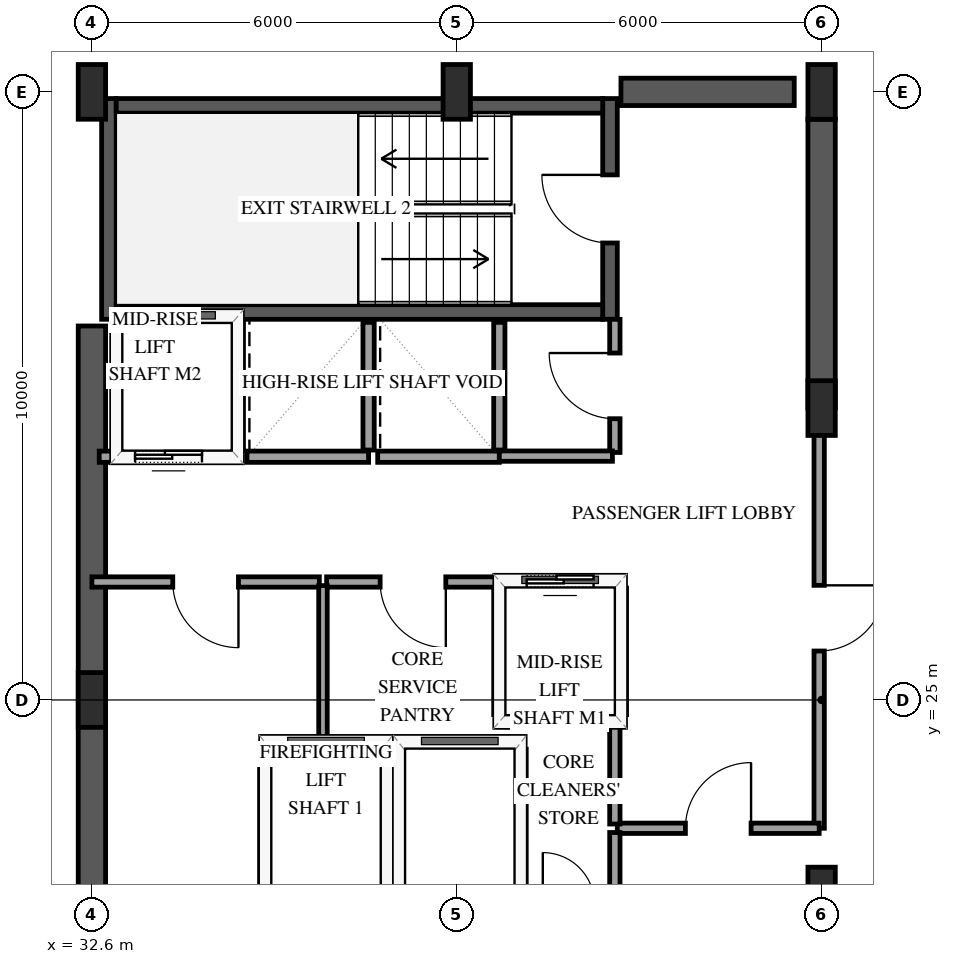
"""IFC4 building model, lengths in metres.
Left out: names, types, materials, properties, quantities, classifications, styles, units other than length and angle.
Written with IfcOpenShell. Run it as: python <this file> out.ifc"""

import sys

from ifc_helpers import new_model, si_unit, direction, frame, frame_2d, origin, origin_2d, place, context, subcontext, project, spatial, rectangle, extrude, element, fill, save


model = new_model("IFC4")
c1 = context("Model", 3, precision=1e-05, world=origin(), true_north=direction((0.0, 1.0)))
c2 = subcontext(c1, "Body", "Model", "MODEL_VIEW")
j1 = project(units=[si_unit("LENGTHUNIT", "METRE"), si_unit("PLANEANGLEUNIT", "RADIAN")], contexts=[c1])
p1 = place(None, origin())
s1 = spatial("IfcSite", under=j1, at=p1, CompositionType="ELEMENT")
p2 = place(p1, origin())
s2 = spatial("IfcBuilding", under=s1, at=p2, CompositionType="ELEMENT")
p3 = place(p2, frame((0.0, 0.0, 197.8)))
s3 = spatial("IfcBuildingStorey", under=s2, at=p3, CompositionType="ELEMENT", Elevation=197.8)
p4 = place(p3, frame((32.88, 31.26, 0.0), z_axis=(0.0, 0.0, 1.0), x_axis=(0.0, 1.0, 0.0)))
e1 = element("IfcWall", 1, at=p4, inside=s3, PredefinedType="SHEAR", context=c2, shape_type="SweptSolid", body=[
    extrude(rectangle(XDim=3.63, YDim=0.24, at=frame_2d((1.815, 0.0))), origin(), (0.0, 0.0, 1.0), 3.6),
])
p5 = place(p3, frame((41.12, 31.26, 0.0), z_axis=(0.0, 0.0, 1.0), x_axis=(0.0, 1.0, 0.0)))
e2 = element("IfcWall", 2, at=p5, inside=s3, PredefinedType="SHEAR", context=c2, shape_type="SweptSolid", body=[
    extrude(rectangle(XDim=3.63, YDim=0.24, at=frame_2d((1.815, 0.0))), origin(), (0.0, 0.0, 1.0), 3.6),
])
p6 = place(p5, frame((1.255, 0.0, 0.0)))
e3 = element("IfcOpeningElement", 3, at=p6, cuts=e2, PredefinedType="OPENING", context=c2, shape_type="SweptSolid", body=[
    extrude(rectangle(XDim=1.12, YDim=2.15, at=frame_2d((0.56, 1.075))), frame((0.0, 0.13, 0.0), z_axis=(0.0, -1.0, 0.0), x_axis=(1.0, 0.0, 0.0)), (0.0, 0.0, 1.0), 0.26),
])
for number, where, z_axis, x_axis in (
    (4, (33.0, 31.38, 0.0), (0.0, 0.0, 1.0), (1.0, 0.0, 0.0)),
    (5, (33.0, 34.77, 0.0), (0.0, 0.0, 1.0), (1.0, 0.0, 0.0)),
):
    element("IfcWall", number, at=place(p3, frame(where, z_axis=z_axis, x_axis=x_axis)), inside=s3, PredefinedType="SHEAR", context=c2, shape_type="SweptSolid", body=[
        extrude(rectangle(XDim=8.0, YDim=0.24, at=frame_2d((4.0, 0.0))), origin(), (0.0, 0.0, 1.0), 3.6),
    ])
p7 = place(p3, frame((32.6, 18.85, 0.0), z_axis=(0.0, 0.0, 1.0), x_axis=(0.0, 1.0, 0.0)))
e6 = element("IfcWall", 6, at=p7, inside=s3, PredefinedType="SHEAR", context=c2, shape_type="SweptSolid", body=[
    extrude(rectangle(XDim=12.3, YDim=0.45, at=frame_2d((6.15, 0.0))), origin(), (0.0, 0.0, 1.0), 3.6),
])
p8 = place(p3, frame((41.3, 35.0, 0.0), z_axis=(0.0, 0.0, 1.0), x_axis=(1.0, 0.0, 0.0)))
e7 = element("IfcWall", 7, at=p8, inside=s3, PredefinedType="SHEAR", context=c2, shape_type="SweptSolid", body=[
    extrude(rectangle(XDim=2.85, YDim=0.45, at=frame_2d((1.425, 0.0))), origin(), (0.0, 0.0, 1.0), 3.6),
])
p9 = place(p3, frame((44.6, 29.8, 0.0), z_axis=(0.0, 0.0, 1.0), x_axis=(0.0, 1.0, 0.0)))
e8 = element("IfcWall", 8, at=p9, inside=s3, PredefinedType="SHEAR", context=c2, shape_type="SweptSolid", body=[
    extrude(rectangle(XDim=4.75, YDim=0.45, at=frame_2d((2.375, 0.0))), origin(), (0.0, 0.0, 1.0), 3.6),
])
for number, where, z_axis, x_axis in (
    (9, (32.6, 25.0, 0.0), (0.0, 0.0, 1.0), (1.0, 0.0, 0.0)),
    (10, (32.6, 35.0, 0.0), (0.0, 0.0, 1.0), (1.0, 0.0, 0.0)),
    (11, (38.6, 35.0, 0.0), (0.0, 0.0, 1.0), (1.0, 0.0, 0.0)),
    (12, (44.6, 21.8, 0.0), (0.0, 0.0, 1.0), (1.0, 0.0, 0.0)),
    (13, (44.6, 29.8, 0.0), (0.0, 0.0, 1.0), (1.0, 0.0, 0.0)),
    (14, (44.6, 35.0, 0.0), (0.0, 0.0, 1.0), (1.0, 0.0, 0.0)),
):
    element("IfcColumn", number, at=place(p3, frame(where, z_axis=z_axis, x_axis=x_axis)), inside=s3, PredefinedType="PILASTER", context=c2, shape_type="SweptSolid", body=[
        extrude(rectangle(XDim=0.45, YDim=0.9, at=origin_2d()), origin(), (0.0, 0.0, 1.0), 3.6),
    ])
p10 = place(p3, frame((35.45, 24.3, 0.0), z_axis=(0.0, 0.0, 1.0), x_axis=(1.0, 0.0, 0.0)))
e15 = element("IfcWall", 15, at=p10, inside=s3, PredefinedType="SOLIDWALL", context=c2, shape_type="SweptSolid", body=[
    extrude(rectangle(XDim=2.0, YDim=0.185, at=frame_2d((1.0, 0.0))), origin(), (0.0, 0.0, 1.0), 3.3),
])
for number, where, z_axis, x_axis in (
    (16, (35.45, 21.81, 0.0), (0.0, 0.0, 1.0), (0.0, 1.0, 0.0)),
    (17, (37.45, 21.81, 0.0), (0.0, 0.0, 1.0), (0.0, 1.0, 0.0)),
):
    element("IfcWall", number, at=place(p3, frame(where, z_axis=z_axis, x_axis=x_axis)), inside=s3, PredefinedType="SOLIDWALL", context=c2, shape_type="SweptSolid", body=[
        extrude(rectangle(XDim=2.38, YDim=0.185, at=frame_2d((1.19, 0.0))), origin(), (0.0, 0.0, 1.0), 3.3),
    ])
p11 = place(p3, frame((37.65, 24.3, 0.0), z_axis=(0.0, 0.0, 1.0), x_axis=(1.0, 0.0, 0.0)))
e18 = element("IfcWall", 18, at=p11, inside=s3, PredefinedType="SOLIDWALL", context=c2, shape_type="SweptSolid", body=[
    extrude(rectangle(XDim=2.0, YDim=0.185, at=frame_2d((1.0, 0.0))), origin(), (0.0, 0.0, 1.0), 3.3),
])
p12 = place(p3, frame((39.65, 21.81, 0.0), z_axis=(0.0, 0.0, 1.0), x_axis=(0.0, 1.0, 0.0)))
e19 = element("IfcWall", 19, at=p12, inside=s3, PredefinedType="SOLIDWALL", context=c2, shape_type="SweptSolid", body=[
    extrude(rectangle(XDim=2.38, YDim=0.185, at=frame_2d((1.19, 0.0))), origin(), (0.0, 0.0, 1.0), 3.3),
])
p13 = place(p3, frame((39.3, 24.65, 0.0), z_axis=(0.0, 0.0, 1.0), x_axis=(1.0, 0.0, 0.0)))
e20 = element("IfcWall", 20, at=p13, inside=s3, PredefinedType="SOLIDWALL", context=c2, shape_type="SweptSolid", body=[
    extrude(rectangle(XDim=2.0, YDim=0.185, at=frame_2d((1.0, 0.0))), origin(), (0.0, 0.0, 1.0), 3.3),
])
p14 = place(p3, frame((39.3, 26.95, 0.0), z_axis=(0.0, 0.0, 1.0), x_axis=(1.0, 0.0, 0.0)))
e21 = element("IfcWall", 21, at=p14, inside=s3, PredefinedType="SOLIDWALL", context=c2, shape_type="SweptSolid", body=[
    extrude(rectangle(XDim=2.0, YDim=0.185, at=frame_2d((1.0, 0.0))), origin(), (0.0, 0.0, 1.0), 3.3),
])
p15 = place(p14, frame((0.45, 0.0, 0.0)))
e22 = element("IfcOpeningElement", 22, at=p15, cuts=e21, PredefinedType="OPENING", context=c2, shape_type="SweptSolid", body=[
    extrude(rectangle(XDim=1.1, YDim=2.15, at=frame_2d((0.55, 1.075))), frame((0.0, 0.103, 0.0), z_axis=(0.0, -1.0, 0.0), x_axis=(1.0, 0.0, 0.0)), (0.0, 0.0, 1.0), 0.205),
])
for number, where, z_axis, x_axis in (
    (23, (39.3, 24.76, 0.0), (0.0, 0.0, 1.0), (0.0, 1.0, 0.0)),
    (24, (41.3, 24.76, 0.0), (0.0, 0.0, 1.0), (0.0, 1.0, 0.0)),
):
    element("IfcWall", number, at=place(p3, frame(where, z_axis=z_axis, x_axis=x_axis)), inside=s3, PredefinedType="SOLIDWALL", context=c2, shape_type="SweptSolid", body=[
        extrude(rectangle(XDim=2.08, YDim=0.185, at=frame_2d((1.04, 0.0))), origin(), (0.0, 0.0, 1.0), 3.3),
    ])
p16 = place(p3, frame((32.72, 29.0, 0.0), z_axis=(0.0, 0.0, 1.0), x_axis=(1.0, 0.0, 0.0)))
e25 = element("IfcWall", 25, at=p16, inside=s3, PredefinedType="SOLIDWALL", context=c2, shape_type="SweptSolid", body=[
    extrude(rectangle(XDim=2.28, YDim=0.185, at=frame_2d((1.14, 0.0))), origin(), (0.0, 0.0, 1.0), 3.3),
])
p17 = place(p16, frame((0.59, 0.0, 0.0)))
e26 = element("IfcOpeningElement", 26, at=p17, cuts=e25, PredefinedType="OPENING", context=c2, shape_type="SweptSolid", body=[
    extrude(rectangle(XDim=1.1, YDim=2.15, at=frame_2d((0.55, 1.075))), frame((0.0, 0.103, 0.0), z_axis=(0.0, -1.0, 0.0), x_axis=(1.0, 0.0, 0.0)), (0.0, 0.0, 1.0), 0.205),
])
p18 = place(p3, frame((35.0, 29.11, 0.0), z_axis=(0.0, 0.0, 1.0), x_axis=(0.0, 1.0, 0.0)))
e27 = element("IfcWall", 27, at=p18, inside=s3, PredefinedType="SOLIDWALL", context=c2, shape_type="SweptSolid", body=[
    extrude(rectangle(XDim=2.1, YDim=0.185, at=frame_2d((1.05, 0.0))), origin(), (0.0, 0.0, 1.0), 3.3),
])
p19 = place(p3, frame((35.15, 29.0, 0.0), z_axis=(0.0, 0.0, 1.0), x_axis=(1.0, 0.0, 0.0)))
e28 = element("IfcWall", 28, at=p19, inside=s3, PredefinedType="SOLIDWALL", context=c2, shape_type="SweptSolid", body=[
    extrude(rectangle(XDim=2.0, YDim=0.185, at=frame_2d((1.0, 0.0))), origin(), (0.0, 0.0, 1.0), 3.3),
])
p20 = place(p3, frame((37.15, 29.11, 0.0), z_axis=(0.0, 0.0, 1.0), x_axis=(0.0, 1.0, 0.0)))
e29 = element("IfcWall", 29, at=p20, inside=s3, PredefinedType="SOLIDWALL", context=c2, shape_type="SweptSolid", body=[
    extrude(rectangle(XDim=2.1, YDim=0.185, at=frame_2d((1.05, 0.0))), origin(), (0.0, 0.0, 1.0), 3.3),
])
p21 = place(p3, frame((37.3, 29.0, 0.0), z_axis=(0.0, 0.0, 1.0), x_axis=(1.0, 0.0, 0.0)))
e30 = element("IfcWall", 30, at=p21, inside=s3, PredefinedType="SOLIDWALL", context=c2, shape_type="SweptSolid", body=[
    extrude(rectangle(XDim=2.0, YDim=0.185, at=frame_2d((1.0, 0.0))), origin(), (0.0, 0.0, 1.0), 3.3),
])
p22 = place(p3, frame((39.3, 29.11, 0.0), z_axis=(0.0, 0.0, 1.0), x_axis=(0.0, 1.0, 0.0)))
e31 = element("IfcWall", 31, at=p22, inside=s3, PredefinedType="SOLIDWALL", context=c2, shape_type="SweptSolid", body=[
    extrude(rectangle(XDim=2.1, YDim=0.185, at=frame_2d((1.05, 0.0))), origin(), (0.0, 0.0, 1.0), 3.3),
])
p23 = place(p3, frame((44.56, 29.8, 0.0), z_axis=(0.0, 0.0, 1.0), x_axis=(0.0, -1.0, 0.0)))
e32 = element("IfcWall", 32, at=p23, inside=s3, PredefinedType="PARTITIONING", context=c2, shape_type="SweptSolid", body=[
    extrude(rectangle(XDim=6.91, YDim=0.17, at=frame_2d((3.455, 0.0))), origin(), (0.0, 0.0, 1.0), 2.34),
])
p24 = place(p23, frame((2.915, 0.0, 0.0)))
e33 = element("IfcOpeningElement", 33, at=p24, cuts=e32, PredefinedType="OPENING", context=c2, shape_type="SweptSolid", body=[
    extrude(rectangle(XDim=1.08, YDim=2.15, at=frame_2d((0.54, 1.075))), frame((0.0, 0.095, 0.0), z_axis=(0.0, -1.0, 0.0), x_axis=(1.0, 0.0, 0.0)), (0.0, 0.0, 1.0), 0.19),
])
p25 = place(p3, frame((36.34, 26.94, 0.0), z_axis=(0.0, 0.0, 1.0), x_axis=(-1.0, 0.0, 0.0)))
e34 = element("IfcWall", 34, at=p25, inside=s3, PredefinedType="PARTITIONING", context=c2, shape_type="SweptSolid", body=[
    extrude(rectangle(XDim=3.74, YDim=0.17, at=frame_2d((1.87, 0.0))), origin(), (0.0, 0.0, 1.0), 3.3),
])
p26 = place(p25, frame((1.33, 0.0, 0.0)))
e35 = element("IfcOpeningElement", 35, at=p26, cuts=e34, PredefinedType="OPENING", context=c2, shape_type="SweptSolid", body=[
    extrude(rectangle(XDim=1.08, YDim=2.15, at=frame_2d((0.54, 1.075))), frame((0.0, 0.095, 0.0), z_axis=(0.0, -1.0, 0.0), x_axis=(1.0, 0.0, 0.0)), (0.0, 0.0, 1.0), 0.19),
])
p27 = place(p3, frame((41.24, 22.89, 0.0), z_axis=(0.0, 0.0, 1.0), x_axis=(1.0, 0.0, 0.0)))
e36 = element("IfcWall", 36, at=p27, inside=s3, PredefinedType="PARTITIONING", context=c2, shape_type="SweptSolid", body=[
    extrude(rectangle(XDim=3.32, YDim=0.17, at=frame_2d((1.66, 0.0))), origin(), (0.0, 0.0, 1.0), 3.3),
])
p28 = place(p27, frame((1.12, 0.0, 0.0)))
e37 = element("IfcOpeningElement", 37, at=p28, cuts=e36, PredefinedType="OPENING", context=c2, shape_type="SweptSolid", body=[
    extrude(rectangle(XDim=1.08, YDim=2.15, at=frame_2d((0.54, 1.075))), frame((0.0, 0.095, 0.0), z_axis=(0.0, -1.0, 0.0), x_axis=(1.0, 0.0, 0.0)), (0.0, 0.0, 1.0), 0.19),
])
p29 = place(p3, frame((39.3, 26.94, 0.0), z_axis=(0.0, 0.0, 1.0), x_axis=(-1.0, 0.0, 0.0)))
e38 = element("IfcWall", 38, at=p29, inside=s3, PredefinedType="PARTITIONING", context=c2, shape_type="SweptSolid", body=[
    extrude(rectangle(XDim=2.84, YDim=0.17, at=frame_2d((1.42, 0.0))), origin(), (0.0, 0.0, 1.0), 3.3),
])
p30 = place(p29, frame((0.88, 0.0, 0.0)))
e39 = element("IfcOpeningElement", 39, at=p30, cuts=e38, PredefinedType="OPENING", context=c2, shape_type="SweptSolid", body=[
    extrude(rectangle(XDim=1.08, YDim=2.15, at=frame_2d((0.54, 1.075))), frame((0.0, 0.095, 0.0), z_axis=(0.0, -1.0, 0.0), x_axis=(1.0, 0.0, 0.0)), (0.0, 0.0, 1.0), 0.19),
])
p31 = place(p3, frame((36.4, 26.88, 0.0), z_axis=(0.0, 0.0, 1.0), x_axis=(0.0, -1.0, 0.0)))
e40 = element("IfcWall", 40, at=p31, inside=s3, PredefinedType="PARTITIONING", context=c2, shape_type="SweptSolid", body=[
    extrude(rectangle(XDim=2.58, YDim=0.14, at=frame_2d((1.29, 0.0))), origin(), (0.0, 0.0, 1.0), 3.3),
])
p32 = place(p3, frame((41.2, 29.07, 0.0), z_axis=(0.0, 0.0, 1.0), x_axis=(0.0, 1.0, 0.0)))
e41 = element("IfcWall", 41, at=p32, inside=s3, PredefinedType="PARTITIONING", context=c2, shape_type="SweptSolid", body=[
    extrude(rectangle(XDim=2.19, YDim=0.17, at=frame_2d((1.095, 0.0))), origin(), (0.0, 0.0, 1.0), 3.3),
])
p33 = place(p32, frame((0.555, 0.0, 0.0)))
e42 = element("IfcOpeningElement", 42, at=p33, cuts=e41, PredefinedType="OPENING", context=c2, shape_type="SweptSolid", body=[
    extrude(rectangle(XDim=1.08, YDim=2.15, at=frame_2d((0.54, 1.075))), frame((0.0, 0.095, 0.0), z_axis=(0.0, -1.0, 0.0), x_axis=(1.0, 0.0, 0.0)), (0.0, 0.0, 1.0), 0.19),
])
p34 = place(p3, frame((39.3, 29.01, 0.0), z_axis=(0.0, 0.0, 1.0), x_axis=(1.0, 0.0, 0.0)))
e43 = element("IfcWall", 43, at=p34, inside=s3, PredefinedType="PARTITIONING", context=c2, shape_type="SweptSolid", body=[
    extrude(rectangle(XDim=1.86, YDim=0.17, at=frame_2d((0.93, 0.0))), origin(), (0.0, 0.0, 1.0), 3.3),
])
p35 = place(p3, frame((41.2, 22.96, 0.0), z_axis=(0.0, 0.0, 1.0), x_axis=(0.0, 1.0, 0.0)))
e44 = element("IfcWall", 44, at=p35, inside=s3, PredefinedType="PARTITIONING", context=c2, shape_type="SweptSolid", body=[
    extrude(rectangle(XDim=1.69, YDim=0.17, at=frame_2d((0.845, 0.0))), origin(), (0.0, 0.0, 1.0), 3.3),
])
p36 = place(p3, frame((41.2, 21.7, 0.0), z_axis=(0.0, 0.0, 1.0), x_axis=(0.0, 1.0, 0.0)))
e45 = element("IfcWall", 45, at=p36, inside=s3, PredefinedType="PARTITIONING", context=c2, shape_type="SweptSolid", body=[
    extrude(rectangle(XDim=1.12, YDim=0.17, at=frame_2d((0.56, 0.0))), origin(), (0.0, 0.0, 1.0), 3.3),
])
p37 = place(p15, origin())
e46 = element("IfcDoor", 46, at=p37, inside=s3, OperationType="SLIDING_TO_LEFT", PredefinedType="DOOR", context=c2, shape_type="SweptSolid", body=[
    extrude(rectangle(XDim=1.1, YDim=2.15, at=frame_2d((0.55, 1.075))), frame((0.0, 0.025, 0.0), z_axis=(0.0, -1.0, 0.0), x_axis=(1.0, 0.0, 0.0)), (0.0, 0.0, 1.0), 0.05),
])
fill(e22, e46)
p38 = place(p17, origin())
e47 = element("IfcDoor", 47, at=p38, inside=s3, OperationType="SLIDING_TO_LEFT", PredefinedType="DOOR", context=c2, shape_type="SweptSolid", body=[
    extrude(rectangle(XDim=1.1, YDim=2.15, at=frame_2d((0.55, 1.075))), frame((0.0, 0.025, 0.0), z_axis=(0.0, -1.0, 0.0), x_axis=(1.0, 0.0, 0.0)), (0.0, 0.0, 1.0), 0.05),
])
fill(e26, e47)
p39 = place(p6, origin())
e48 = element("IfcDoor", 48, at=p39, inside=s3, OperationType="SINGLE_SWING_RIGHT", PredefinedType="DOOR", context=c2, shape_type="SweptSolid", body=[
    extrude(rectangle(XDim=1.12, YDim=2.15, at=frame_2d((0.56, 1.075))), frame((0.0, 0.025, 0.0), z_axis=(0.0, -1.0, 0.0), x_axis=(1.0, 0.0, 0.0)), (0.0, 0.0, 1.0), 0.05),
])
fill(e3, e48)
p40 = place(p24, origin())
e49 = element("IfcDoor", 49, at=p40, inside=s3, OperationType="SINGLE_SWING_LEFT", PredefinedType="DOOR", context=c2, shape_type="SweptSolid", body=[
    extrude(rectangle(XDim=1.08, YDim=2.15, at=frame_2d((0.54, 1.075))), frame((0.0, 0.025, 0.0), z_axis=(0.0, -1.0, 0.0), x_axis=(1.0, 0.0, 0.0)), (0.0, 0.0, 1.0), 0.05),
])
fill(e33, e49)
p41 = place(p26, origin())
e50 = element("IfcDoor", 50, at=p41, inside=s3, OperationType="SINGLE_SWING_LEFT", PredefinedType="DOOR", context=c2, shape_type="SweptSolid", body=[
    extrude(rectangle(XDim=1.08, YDim=2.15, at=frame_2d((0.54, 1.075))), frame((0.0, 0.025, 0.0), z_axis=(0.0, -1.0, 0.0), x_axis=(1.0, 0.0, 0.0)), (0.0, 0.0, 1.0), 0.05),
])
fill(e35, e50)
p42 = place(p28, origin())
e51 = element("IfcDoor", 51, at=p42, inside=s3, OperationType="SINGLE_SWING_RIGHT", PredefinedType="DOOR", context=c2, shape_type="SweptSolid", body=[
    extrude(rectangle(XDim=1.08, YDim=2.15, at=frame_2d((0.54, 1.075))), frame((0.0, 0.025, 0.0), z_axis=(0.0, -1.0, 0.0), x_axis=(1.0, 0.0, 0.0)), (0.0, 0.0, 1.0), 0.05),
])
fill(e37, e51)
p43 = place(p30, origin())
e52 = element("IfcDoor", 52, at=p43, inside=s3, OperationType="SINGLE_SWING_LEFT", PredefinedType="DOOR", context=c2, shape_type="SweptSolid", body=[
    extrude(rectangle(XDim=1.08, YDim=2.15, at=frame_2d((0.54, 1.075))), frame((0.0, 0.025, 0.0), z_axis=(0.0, -1.0, 0.0), x_axis=(1.0, 0.0, 0.0)), (0.0, 0.0, 1.0), 0.05),
])
fill(e39, e52)
p44 = place(p33, origin())
e53 = element("IfcDoor", 53, at=p44, inside=s3, OperationType="SINGLE_SWING_RIGHT", PredefinedType="DOOR", context=c2, shape_type="SweptSolid", body=[
    extrude(rectangle(XDim=1.08, YDim=2.15, at=frame_2d((0.54, 1.075))), frame((0.0, 0.025, 0.0), z_axis=(0.0, -1.0, 0.0), x_axis=(1.0, 0.0, 0.0)), (0.0, 0.0, 1.0), 0.05),
])
fill(e42, e53)
save(model, sys.argv[1])
